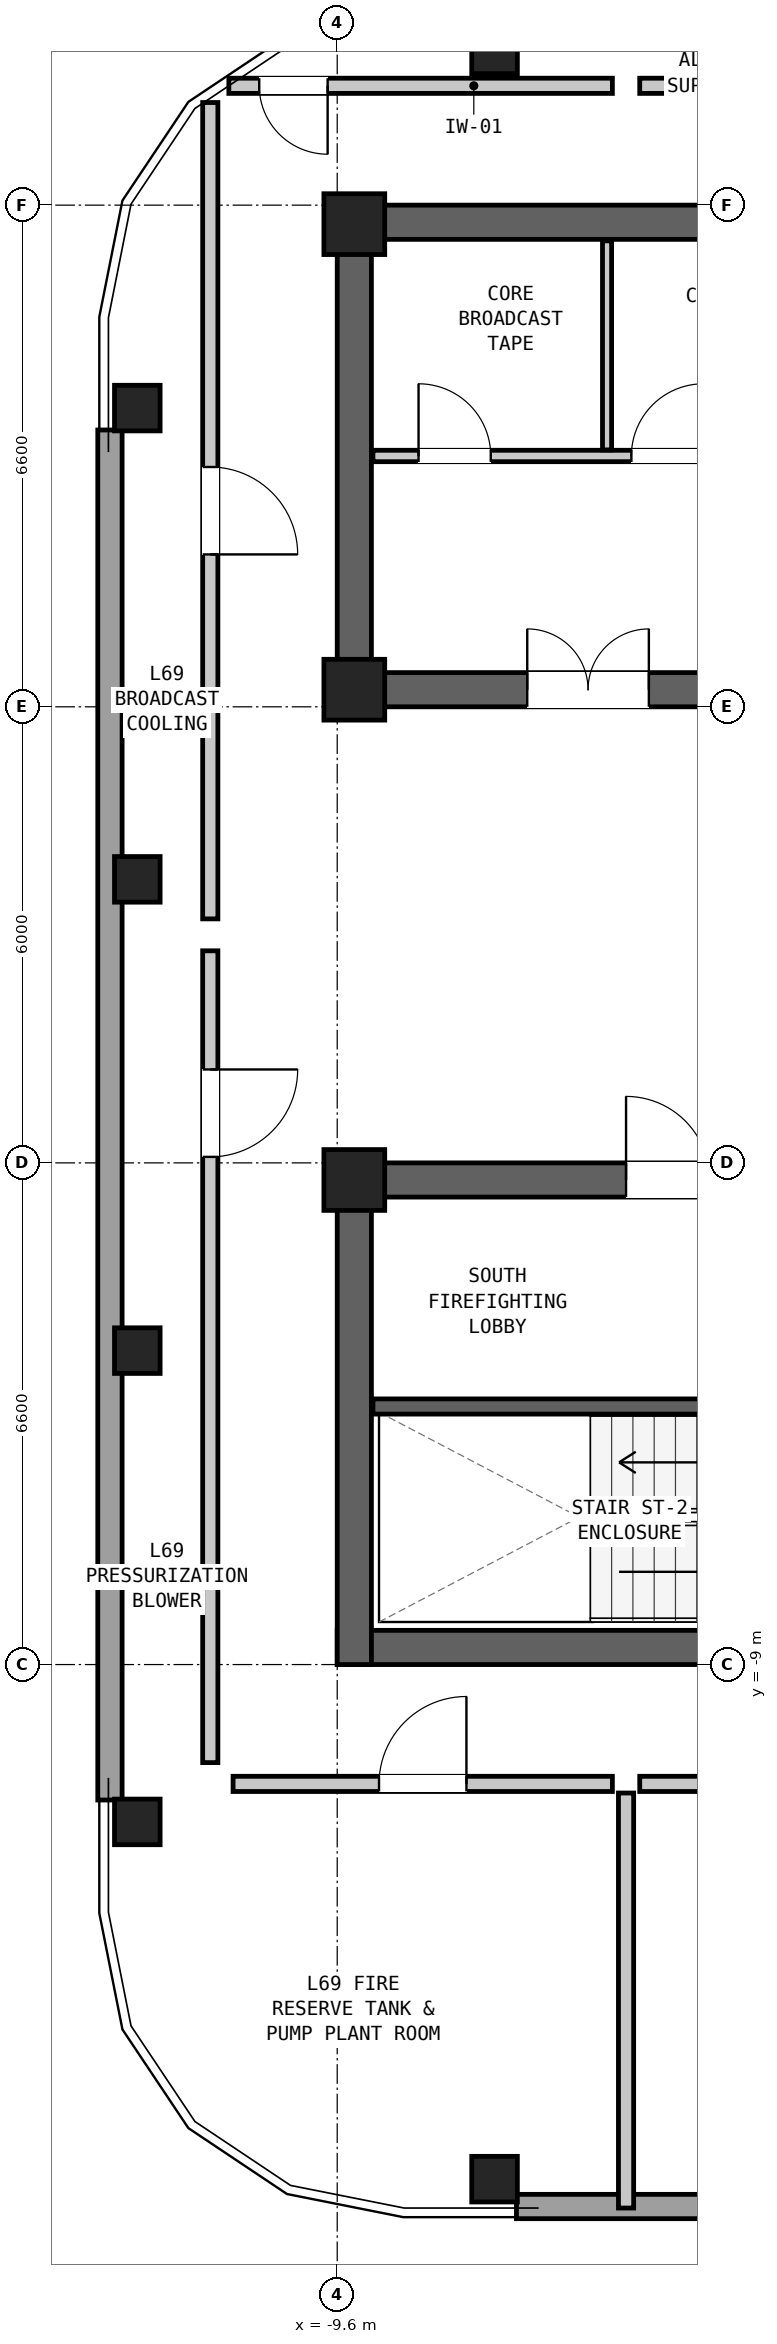
"""IFC4 building model, lengths in metres.
Left out: names, types, materials, properties, quantities, classifications, styles, units other than length and angle.
Written with IfcOpenShell. Run it as: python <this file> out.ifc"""

import sys

from ifc_helpers import new_model, si_unit, direction, frame, frame_2d, origin, origin_2d, place, context, subcontext, project, spatial, rectangle, hollow_rectangle, extrude, element, fill, save


model = new_model("IFC4")
c1 = context("Model", 3, precision=1e-05, world=origin(), true_north=direction((0.0, 1.0)))
c2 = subcontext(c1, "Body", "Model", "MODEL_VIEW")
j1 = project(units=[si_unit("LENGTHUNIT", "METRE"), si_unit("PLANEANGLEUNIT", "RADIAN")], contexts=[c1])
p1 = place(None, origin())
s1 = spatial("IfcSite", under=j1, at=p1, CompositionType="ELEMENT")
p2 = place(p1, origin())
s2 = spatial("IfcBuilding", under=s1, at=p2, CompositionType="ELEMENT")
p3 = place(p2, frame((0.0, 0.0, 234.9)))
s3 = spatial("IfcBuildingStorey", under=s2, at=p3, CompositionType="ELEMENT", Elevation=234.9)
p4 = place(p3, frame((-9.6, 9.975, 0.0), z_axis=(0.0, 0.0, 1.0), x_axis=(1.0, 0.0, 0.0)))
e1 = element("IfcWall", 1, at=p4, inside=s3, PredefinedType="SHEAR", context=c2, shape_type="SweptSolid", body=[
    extrude(rectangle(XDim=19.2, YDim=0.45, at=frame_2d((9.6, 0.0))), origin(), (0.0, 0.0, 1.0), 3.6),
])
p5 = place(p3, frame((-9.6, 3.825, 0.0), z_axis=(0.0, 0.0, 1.0), x_axis=(1.0, 0.0, 0.0)))
e2 = element("IfcWall", 2, at=p5, inside=s3, PredefinedType="SHEAR", context=c2, shape_type="SweptSolid", body=[
    extrude(rectangle(XDim=19.2, YDim=0.45, at=frame_2d((9.6, 0.0))), origin(), (0.0, 0.0, 1.0), 3.6),
])
p6 = place(p5, frame((14.2, 0.0, 0.0)))
e3 = element("IfcOpeningElement", 3, at=p6, cuts=e2, PredefinedType="OPENING", context=c2, shape_type="SweptSolid", body=[
    extrude(rectangle(XDim=1.1, YDim=2.08, at=frame_2d((0.55, 1.04))), frame((0.0, 0.237, 0.0), z_axis=(0.0, -1.0, 0.0), x_axis=(1.0, 0.0, 0.0)), (0.0, 0.0, 1.0), 0.474),
])
p7 = place(p5, frame((8.2, 0.0, 0.0)))
e4 = element("IfcOpeningElement", 4, at=p7, cuts=e2, PredefinedType="OPENING", context=c2, shape_type="SweptSolid", body=[
    extrude(rectangle(XDim=1.15, YDim=2.1, at=frame_2d((0.575, 1.05))), frame((0.0, 0.237, 0.0), z_axis=(0.0, -1.0, 0.0), x_axis=(1.0, 0.0, 0.0)), (0.0, 0.0, 1.0), 0.474),
])
p8 = place(p5, frame((2.5, 0.0, 0.0)))
e5 = element("IfcOpeningElement", 5, at=p8, cuts=e2, PredefinedType="OPENING", context=c2, shape_type="SweptSolid", body=[
    extrude(rectangle(XDim=1.6, YDim=2.12, at=frame_2d((0.8, 1.06))), frame((0.0, 0.237, 0.0), z_axis=(0.0, -1.0, 0.0), x_axis=(1.0, 0.0, 0.0)), (0.0, 0.0, 1.0), 0.474),
])
p9 = place(p3, frame((-9.375, 3.6, 0.0), z_axis=(0.0, 0.0, 1.0), x_axis=(0.0, 1.0, 0.0)))
e6 = element("IfcWall", 6, at=p9, inside=s3, PredefinedType="SHEAR", context=c2, shape_type="SweptSolid", body=[
    extrude(rectangle(XDim=6.6, YDim=0.45, at=frame_2d((3.3, 0.0))), origin(), (0.0, 0.0, 1.0), 3.6),
])
p10 = place(p3, frame((-9.6, -8.775, 0.0), z_axis=(0.0, 0.0, 1.0), x_axis=(1.0, 0.0, 0.0)))
e7 = element("IfcWall", 7, at=p10, inside=s3, PredefinedType="SHEAR", context=c2, shape_type="SweptSolid", body=[
    extrude(rectangle(XDim=19.2, YDim=0.45, at=frame_2d((9.6, 0.0))), origin(), (0.0, 0.0, 1.0), 3.6),
])
p11 = place(p3, frame((-9.6, -2.625, 0.0), z_axis=(0.0, 0.0, 1.0), x_axis=(1.0, 0.0, 0.0)))
e8 = element("IfcWall", 8, at=p11, inside=s3, PredefinedType="SHEAR", context=c2, shape_type="SweptSolid", body=[
    extrude(rectangle(XDim=19.2, YDim=0.45, at=frame_2d((9.6, 0.0))), origin(), (0.0, 0.0, 1.0), 3.6),
])
p12 = place(p11, frame((3.8, 0.0, 0.0)))
e9 = element("IfcOpeningElement", 9, at=p12, cuts=e8, PredefinedType="OPENING", context=c2, shape_type="SweptSolid", body=[
    extrude(rectangle(XDim=1.1, YDim=2.08, at=frame_2d((0.55, 1.04))), frame((0.0, 0.237, 0.0), z_axis=(0.0, -1.0, 0.0), x_axis=(1.0, 0.0, 0.0)), (0.0, 0.0, 1.0), 0.474),
])
p13 = place(p11, frame((10.15, 0.0, 0.0)))
e10 = element("IfcOpeningElement", 10, at=p13, cuts=e8, PredefinedType="OPENING", context=c2, shape_type="SweptSolid", body=[
    extrude(rectangle(XDim=0.9, YDim=2.05, at=frame_2d((0.45, 1.025))), frame((0.0, 0.237, 0.0), z_axis=(0.0, -1.0, 0.0), x_axis=(1.0, 0.0, 0.0)), (0.0, 0.0, 1.0), 0.474),
])
p14 = place(p11, frame((12.1, 0.0, 0.0)))
e11 = element("IfcOpeningElement", 11, at=p14, cuts=e8, PredefinedType="OPENING", context=c2, shape_type="SweptSolid", body=[
    extrude(rectangle(XDim=0.95, YDim=2.1, at=frame_2d((0.475, 1.05))), frame((0.0, 0.237, 0.0), z_axis=(0.0, -1.0, 0.0), x_axis=(1.0, 0.0, 0.0)), (0.0, 0.0, 1.0), 0.474),
])
p15 = place(p11, frame((14.8, 0.0, 0.0)))
e12 = element("IfcOpeningElement", 12, at=p15, cuts=e8, PredefinedType="OPENING", context=c2, shape_type="SweptSolid", body=[
    extrude(rectangle(XDim=1.6, YDim=2.12, at=frame_2d((0.8, 1.06))), frame((0.0, 0.237, 0.0), z_axis=(0.0, -1.0, 0.0), x_axis=(1.0, 0.0, 0.0)), (0.0, 0.0, 1.0), 0.474),
])
p16 = place(p3, frame((-9.375, -9.0, 0.0), z_axis=(0.0, 0.0, 1.0), x_axis=(0.0, 1.0, 0.0)))
e13 = element("IfcWall", 13, at=p16, inside=s3, PredefinedType="SHEAR", context=c2, shape_type="SweptSolid", body=[
    extrude(rectangle(XDim=6.6, YDim=0.45, at=frame_2d((3.3, 0.0))), origin(), (0.0, 0.0, 1.0), 3.6),
])
for number, where, z_axis, x_axis in (
    (14, (-7.53, -15.77, 0.0), (0.0, 0.0, 1.0), (1.0, 0.0, 0.0)),
    (15, (-7.53, 12.23, 0.0), (0.0, 0.0, 1.0), (1.0, 0.0, 0.0)),
    (16, (-12.23, 7.53, 0.0), (0.0, 0.0, 1.0), (0.0, 1.0, 0.0)),
    (17, (-12.23, 1.33, 0.0), (0.0, 0.0, 1.0), (0.0, 1.0, 0.0)),
    (18, (-12.23, -4.87, 0.0), (0.0, 0.0, 1.0), (0.0, 1.0, 0.0)),
    (19, (-12.23, -11.07, 0.0), (0.0, 0.0, 1.0), (0.0, 1.0, 0.0)),
):
    element("IfcColumn", number, at=place(p3, frame(where, z_axis=z_axis, x_axis=x_axis)), inside=s3, PredefinedType="COLUMN", context=c2, shape_type="SweptSolid", body=[
        extrude(hollow_rectangle(XDim=0.6, YDim=0.6, WallThickness=0.04, at=origin_2d()), origin(), (0.0, 0.0, 1.0), 3.6),
    ])
for number, where, z_axis, x_axis in (
    (20, (-9.375, 9.95, 0.0), (0.0, 0.0, 1.0), (1.0, 0.0, 0.0)),
    (21, (-9.375, 3.825, 0.0), (0.0, 0.0, 1.0), (1.0, 0.0, 0.0)),
    (22, (-9.375, -2.625, 0.0), (0.0, 0.0, 1.0), (1.0, 0.0, 0.0)),
):
    element("IfcColumn", number, at=place(p3, frame(where, z_axis=z_axis, x_axis=x_axis)), inside=s3, PredefinedType="COLUMN", context=c2, shape_type="SweptSolid", body=[
        extrude(rectangle(XDim=0.8, YDim=0.8, at=origin_2d()), origin(), (0.0, 0.0, 1.0), 3.6),
    ])
for number, where, z_axis, x_axis in (
    (23, (10.782, -16.13, 0.0), (0.0, 0.0, 1.0), (-1.0, 0.0, 0.0)),
    (24, (-12.59, -10.782, 0.0), (0.0, 0.0, 1.0), (0.0, 1.0, 0.0)),
):
    element("IfcWall", number, at=place(p3, frame(where, z_axis=z_axis, x_axis=x_axis)), inside=s3, PredefinedType="SOLIDWALL", context=c2, shape_type="SweptSolid", body=[
        extrude(rectangle(XDim=18.024, YDim=0.32, at=frame_2d((9.012, 0.0))), origin(), (0.0, 0.0, 1.0), 2.082),
    ])
p17 = place(p3, frame((-9.13, 6.9, 0.0), z_axis=(0.0, 0.0, 1.0), x_axis=(1.0, 0.0, 0.0)))
e25 = element("IfcWall", 25, at=p17, inside=s3, PredefinedType="PARTITIONING", context=c2, shape_type="SweptSolid", body=[
    extrude(rectangle(XDim=6.01, YDim=0.15, at=frame_2d((3.005, 0.0))), origin(), (0.0, 0.0, 1.0), 3.22),
])
p18 = place(p17, frame((0.6, 0.0, 0.0)))
e26 = element("IfcOpeningElement", 26, at=p18, cuts=e25, PredefinedType="OPENING", context=c2, shape_type="SweptSolid", body=[
    extrude(rectangle(XDim=0.95, YDim=2.1, at=frame_2d((0.475, 1.05))), frame((0.0, 0.087, 0.0), z_axis=(0.0, -1.0, 0.0), x_axis=(1.0, 0.0, 0.0)), (0.0, 0.0, 1.0), 0.174),
])
p19 = place(p17, frame((3.4, 0.0, 0.0)))
e27 = element("IfcOpeningElement", 27, at=p19, cuts=e25, PredefinedType="OPENING", context=c2, shape_type="SweptSolid", body=[
    extrude(rectangle(XDim=0.95, YDim=2.1, at=frame_2d((0.475, 1.05))), frame((0.0, 0.087, 0.0), z_axis=(0.0, -1.0, 0.0), x_axis=(1.0, 0.0, 0.0)), (0.0, 0.0, 1.0), 0.174),
])
p20 = place(p3, frame((-6.05, 6.98, 0.0), z_axis=(0.0, 0.0, 1.0), x_axis=(0.0, 1.0, 0.0)))
e28 = element("IfcWall", 28, at=p20, inside=s3, PredefinedType="PARTITIONING", context=c2, shape_type="SweptSolid", body=[
    extrude(rectangle(XDim=2.75, YDim=0.12, at=frame_2d((1.375, 0.0))), origin(), (0.0, 0.0, 1.0), 3.22),
])
p21 = place(p3, frame((-9.13, -5.605, 0.0), z_axis=(0.0, 0.0, 1.0), x_axis=(1.0, 0.0, 0.0)))
e29 = element("IfcWall", 29, at=p21, inside=s3, PredefinedType="SHEAR", context=c2, shape_type="SweptSolid", body=[
    extrude(rectangle(XDim=6.77, YDim=0.2, at=frame_2d((3.385, 0.0))), origin(), (0.0, 0.0, 1.0), 3.22),
])
p22 = place(p21, frame((5.5, 0.0, 0.0)))
e30 = element("IfcOpeningElement", 30, at=p22, cuts=e29, PredefinedType="OPENING", context=c2, shape_type="SweptSolid", body=[
    extrude(rectangle(XDim=1.05, YDim=2.08, at=frame_2d((0.525, 1.04))), frame((0.0, 0.112, 0.0), z_axis=(0.0, -1.0, 0.0), x_axis=(1.0, 0.0, 0.0)), (0.0, 0.0, 1.0), 0.224),
])
p23 = place(p3, frame((-5.98, 11.77, 0.0), z_axis=(0.0, 0.0, 1.0), x_axis=(-1.0, 0.0, 0.0)))
e31 = element("IfcWall", 31, at=p23, inside=s3, PredefinedType="PARTITIONING", context=c2, shape_type="SweptSolid", body=[
    extrude(rectangle(XDim=5.046, YDim=0.2, at=frame_2d((2.523, 0.0))), origin(), (0.0, 0.0, 1.0), 2.082),
])
p24 = place(p23, frame((3.746, 0.0, 0.0)))
e32 = element("IfcOpeningElement", 32, at=p24, cuts=e31, PredefinedType="OPENING", context=c2, shape_type="SweptSolid", body=[
    extrude(rectangle(XDim=0.9, YDim=2.05, at=frame_2d((0.45, 1.025))), frame((0.0, 0.112, 0.0), z_axis=(0.0, -1.0, 0.0), x_axis=(1.0, 0.0, 0.0)), (0.0, 0.0, 1.0), 0.224),
])
p25 = place(p3, frame((-0.53, 11.77, 0.0), z_axis=(0.0, 0.0, 1.0), x_axis=(-1.0, 0.0, 0.0)))
e33 = element("IfcWall", 33, at=p25, inside=s3, PredefinedType="PARTITIONING", context=c2, shape_type="SweptSolid", body=[
    extrude(rectangle(XDim=5.09, YDim=0.2, at=frame_2d((2.545, 0.0))), origin(), (0.0, 0.0, 1.0), 2.082),
])
p26 = place(p25, frame((1.97, 0.0, 0.0)))
e34 = element("IfcOpeningElement", 34, at=p26, cuts=e33, PredefinedType="OPENING", context=c2, shape_type="SweptSolid", body=[
    extrude(rectangle(XDim=0.9, YDim=2.05, at=frame_2d((0.45, 1.025))), frame((0.0, 0.112, 0.0), z_axis=(0.0, -1.0, 0.0), x_axis=(1.0, 0.0, 0.0)), (0.0, 0.0, 1.0), 0.224),
])
p27 = place(p3, frame((-10.97, -10.57, 0.0), z_axis=(0.0, 0.0, 1.0), x_axis=(1.0, 0.0, 0.0)))
e35 = element("IfcWall", 35, at=p27, inside=s3, PredefinedType="PARTITIONING", context=c2, shape_type="SweptSolid", body=[
    extrude(rectangle(XDim=4.99, YDim=0.2, at=frame_2d((2.495, 0.0))), origin(), (0.0, 0.0, 1.0), 3.22),
])
p28 = place(p27, frame((1.92, 0.0, 0.0)))
e36 = element("IfcOpeningElement", 36, at=p28, cuts=e35, PredefinedType="OPENING", context=c2, shape_type="SweptSolid", body=[
    extrude(rectangle(XDim=1.15, YDim=2.1, at=frame_2d((0.575, 1.05))), frame((0.0, 0.112, 0.0), z_axis=(0.0, -1.0, 0.0), x_axis=(1.0, 0.0, 0.0)), (0.0, 0.0, 1.0), 0.224),
])
p29 = place(p3, frame((-5.8, -16.15, 0.0), z_axis=(0.0, 0.0, 1.0), x_axis=(0.0, 1.0, 0.0)))
e37 = element("IfcWall", 37, at=p29, inside=s3, PredefinedType="PARTITIONING", context=c2, shape_type="SweptSolid", body=[
    extrude(rectangle(XDim=5.46, YDim=0.2, at=frame_2d((2.73, 0.0))), origin(), (0.0, 0.0, 1.0), 2.438),
])
p30 = place(p3, frame((-5.62, -10.57, 0.0), z_axis=(0.0, 0.0, 1.0), x_axis=(1.0, 0.0, 0.0)))
e38 = element("IfcWall", 38, at=p30, inside=s3, PredefinedType="PARTITIONING", context=c2, shape_type="SweptSolid", body=[
    extrude(rectangle(XDim=5.09, YDim=0.2, at=frame_2d((2.545, 0.0))), origin(), (0.0, 0.0, 1.0), 3.22),
])
p31 = place(p30, frame((1.99, 0.0, 0.0)))
e39 = element("IfcOpeningElement", 39, at=p31, cuts=e38, PredefinedType="OPENING", context=c2, shape_type="SweptSolid", body=[
    extrude(rectangle(XDim=1.15, YDim=2.1, at=frame_2d((0.575, 1.05))), frame((0.0, 0.112, 0.0), z_axis=(0.0, -1.0, 0.0), x_axis=(1.0, 0.0, 0.0)), (0.0, 0.0, 1.0), 0.224),
])
p32 = place(p3, frame((-11.27, 0.39, 0.0), z_axis=(0.0, 0.0, 1.0), x_axis=(0.0, -1.0, 0.0)))
e40 = element("IfcWall", 40, at=p32, inside=s3, PredefinedType="PARTITIONING", context=c2, shape_type="SweptSolid", body=[
    extrude(rectangle(XDim=10.68, YDim=0.2, at=frame_2d((5.34, 0.0))), origin(), (0.0, 0.0, 1.0), 3.22),
])
p33 = place(p32, frame((1.561, 0.0, 0.0)))
e41 = element("IfcOpeningElement", 41, at=p33, cuts=e40, PredefinedType="OPENING", context=c2, shape_type="SweptSolid", body=[
    extrude(rectangle(XDim=1.15, YDim=2.1, at=frame_2d((0.575, 1.05))), frame((0.0, 0.112, 0.0), z_axis=(0.0, -1.0, 0.0), x_axis=(1.0, 0.0, 0.0)), (0.0, 0.0, 1.0), 0.224),
])
p34 = place(p3, frame((-11.27, 11.55, 0.0), z_axis=(0.0, 0.0, 1.0), x_axis=(0.0, -1.0, 0.0)))
e42 = element("IfcWall", 42, at=p34, inside=s3, PredefinedType="PARTITIONING", context=c2, shape_type="SweptSolid", body=[
    extrude(rectangle(XDim=10.74, YDim=0.2, at=frame_2d((5.37, 0.0))), origin(), (0.0, 0.0, 1.0), 3.22),
])
p35 = place(p34, frame((4.795, 0.0, 0.0)))
e43 = element("IfcOpeningElement", 43, at=p35, cuts=e42, PredefinedType="OPENING", context=c2, shape_type="SweptSolid", body=[
    extrude(rectangle(XDim=1.15, YDim=2.1, at=frame_2d((0.575, 1.05))), frame((0.0, 0.112, 0.0), z_axis=(0.0, -1.0, 0.0), x_axis=(1.0, 0.0, 0.0)), (0.0, 0.0, 1.0), 0.224),
])
p36 = place(p8, origin())
e44 = element("IfcDoor", 44, at=p36, inside=s3, OperationType="DOUBLE_DOOR_SINGLE_SWING", PredefinedType="DOOR", context=c2, shape_type="SweptSolid", body=[
    extrude(rectangle(XDim=1.6, YDim=2.12, at=frame_2d((0.8, 1.06))), frame((0.0, 0.025, 0.0), z_axis=(0.0, -1.0, 0.0), x_axis=(1.0, 0.0, 0.0)), (0.0, 0.0, 1.0), 0.05),
])
fill(e5, e44)
p37 = place(p18, origin())
e45 = element("IfcDoor", 45, at=p37, inside=s3, OperationType="SINGLE_SWING_LEFT", PredefinedType="DOOR", context=c2, shape_type="SweptSolid", body=[
    extrude(rectangle(XDim=0.95, YDim=2.1, at=frame_2d((0.475, 1.05))), frame((0.0, 0.025, 0.0), z_axis=(0.0, -1.0, 0.0), x_axis=(1.0, 0.0, 0.0)), (0.0, 0.0, 1.0), 0.05),
])
fill(e26, e45)
p38 = place(p19, origin())
e46 = element("IfcDoor", 46, at=p38, inside=s3, OperationType="SINGLE_SWING_RIGHT", PredefinedType="DOOR", context=c2, shape_type="SweptSolid", body=[
    extrude(rectangle(XDim=0.95, YDim=2.1, at=frame_2d((0.475, 1.05))), frame((0.0, 0.025, 0.0), z_axis=(0.0, -1.0, 0.0), x_axis=(1.0, 0.0, 0.0)), (0.0, 0.0, 1.0), 0.05),
])
fill(e27, e46)
p39 = place(p12, origin())
e47 = element("IfcDoor", 47, at=p39, inside=s3, OperationType="SINGLE_SWING_LEFT", PredefinedType="DOOR", context=c2, shape_type="SweptSolid", body=[
    extrude(rectangle(XDim=1.1, YDim=2.08, at=frame_2d((0.55, 1.04))), frame((0.0, 0.025, 0.0), z_axis=(0.0, -1.0, 0.0), x_axis=(1.0, 0.0, 0.0)), (0.0, 0.0, 1.0), 0.05),
])
fill(e9, e47)
p40 = place(p24, origin())
e48 = element("IfcDoor", 48, at=p40, inside=s3, OperationType="SINGLE_SWING_LEFT", PredefinedType="DOOR", context=c2, shape_type="SweptSolid", body=[
    extrude(rectangle(XDim=0.9, YDim=2.05, at=frame_2d((0.45, 1.025))), frame((0.0, 0.025, 0.0), z_axis=(0.0, -1.0, 0.0), x_axis=(1.0, 0.0, 0.0)), (0.0, 0.0, 1.0), 0.05),
])
fill(e32, e48)
p41 = place(p28, origin())
e49 = element("IfcDoor", 49, at=p41, inside=s3, OperationType="SINGLE_SWING_RIGHT", PredefinedType="DOOR", context=c2, shape_type="SweptSolid", body=[
    extrude(rectangle(XDim=1.15, YDim=2.1, at=frame_2d((0.575, 1.05))), frame((0.0, 0.025, 0.0), z_axis=(0.0, -1.0, 0.0), x_axis=(1.0, 0.0, 0.0)), (0.0, 0.0, 1.0), 0.05),
])
fill(e36, e49)
p42 = place(p33, origin())
e50 = element("IfcDoor", 50, at=p42, inside=s3, OperationType="SINGLE_SWING_LEFT", PredefinedType="DOOR", context=c2, shape_type="SweptSolid", body=[
    extrude(rectangle(XDim=1.15, YDim=2.1, at=frame_2d((0.575, 1.05))), frame((0.0, 0.025, 0.0), z_axis=(0.0, -1.0, 0.0), x_axis=(1.0, 0.0, 0.0)), (0.0, 0.0, 1.0), 0.05),
])
fill(e41, e50)
p43 = place(p35, origin())
e51 = element("IfcDoor", 51, at=p43, inside=s3, OperationType="SINGLE_SWING_RIGHT", PredefinedType="DOOR", context=c2, shape_type="SweptSolid", body=[
    extrude(rectangle(XDim=1.15, YDim=2.1, at=frame_2d((0.575, 1.05))), frame((0.0, 0.025, 0.0), z_axis=(0.0, -1.0, 0.0), x_axis=(1.0, 0.0, 0.0)), (0.0, 0.0, 1.0), 0.05),
])
fill(e43, e51)
save(model, sys.argv[1])
